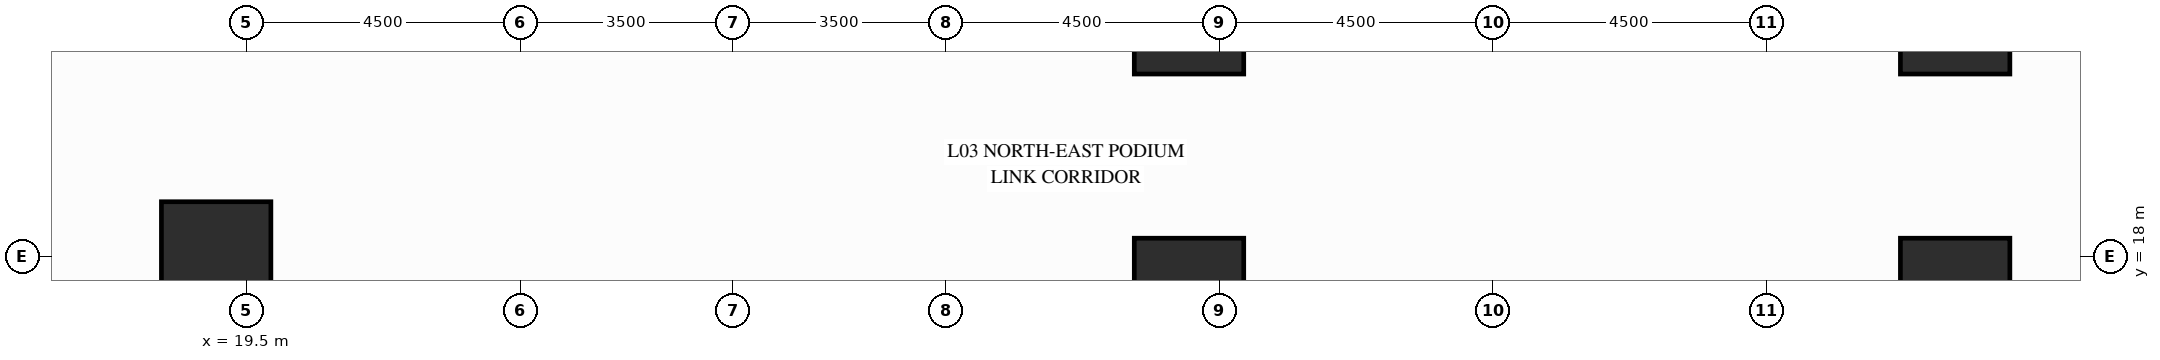
"""IFC4 building model, lengths in metres.
Left out: names, types, materials, properties, quantities, classifications, styles, units other than length and angle.
Written with IfcOpenShell. Run it as: python <this file> out.ifc"""

import sys

from ifc_helpers import new_model, si_unit, direction, frame, origin, origin_2d, place, context, subcontext, project, spatial, rectangle, extrude, source, transform, mapped, element, save


model = new_model("IFC4")
c1 = context("Model", 3, precision=1e-05, world=origin(), true_north=direction((0.0, 1.0)))
c2 = subcontext(c1, "Body", "Model", "MODEL_VIEW")
j1 = project(units=[si_unit("LENGTHUNIT", "METRE"), si_unit("PLANEANGLEUNIT", "RADIAN")], contexts=[c1])
p1 = place(None, origin())
s1 = spatial("IfcSite", under=j1, at=p1, CompositionType="ELEMENT")
p2 = place(p1, origin())
s2 = spatial("IfcBuilding", under=s1, at=p2, CompositionType="ELEMENT")
p3 = place(p2, frame((0.0, 0.0, 13.5)))
s3 = spatial("IfcBuildingStorey", under=s2, at=p3, CompositionType="ELEMENT", Elevation=13.5)
m1 = source(origin(), c2, "Body", "SweptSolid", [
    extrude(rectangle(XDim=1.8, YDim=1.8, at=origin_2d()), origin(), (0.0, 0.0, 1.0), 4.15),
])
for number, where, z_axis, x_axis in (
    (1, (47.6, 17.4, 0.0), (0.0, 0.0, 1.0), (1.0, 0.0, 0.0)),
    (2, (47.6, 21.9, 0.0), (0.0, 0.0, 1.0), (1.0, 0.0, 0.0)),
    (3, (19.0, 18.0, 0.0), (0.0, 0.0, 1.0), (1.0, 0.0, 0.0)),
    (4, (35.0, 17.4, 0.0), (0.0, 0.0, 1.0), (1.0, 0.0, 0.0)),
    (5, (35.0, 21.9, 0.0), (0.0, 0.0, 1.0), (1.0, 0.0, 0.0)),
):
    element("IfcColumn", number, at=place(p3, frame(where, z_axis=z_axis, x_axis=x_axis)), inside=s3, PredefinedType="COLUMN", context=c2, shape_type="MappedRepresentation", body=[
        mapped(m1, transform((0.0, 0.0, 0.0), x_axis=(1.0, 0.0, 0.0), y_axis=(0.0, 1.0, 0.0), z_axis=(0.0, 0.0, 1.0))),
    ])
save(model, sys.argv[1])
